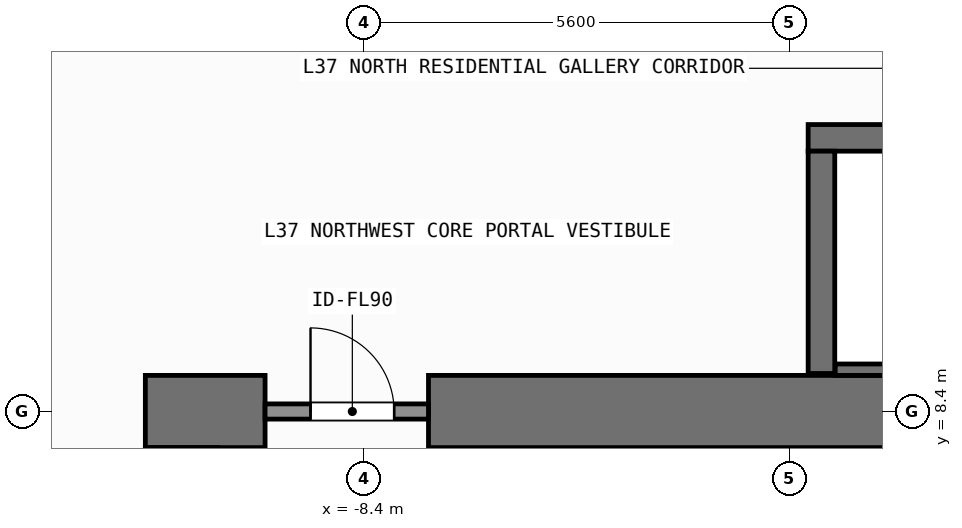
"""IFC4 building model, lengths in metres.
Left out: names, types, materials, properties, quantities, classifications, styles, units other than length and angle.
Written with IfcOpenShell. Run it as: python <this file> out.ifc"""

import sys

from ifc_helpers import new_model, si_unit, direction, frame, frame_2d, origin, place, context, subcontext, project, spatial, rectangle, extrude, element, fill, save


model = new_model("IFC4")
c1 = context("Model", 3, precision=1e-05, world=origin(), true_north=direction((0.0, 1.0)))
c2 = subcontext(c1, "Body", "Model", "MODEL_VIEW")
j1 = project(units=[si_unit("LENGTHUNIT", "METRE"), si_unit("PLANEANGLEUNIT", "RADIAN")], contexts=[c1])
p1 = place(None, origin())
s1 = spatial("IfcSite", under=j1, at=p1, CompositionType="ELEMENT")
p2 = place(p1, origin())
s2 = spatial("IfcBuilding", under=s1, at=p2, CompositionType="ELEMENT")
p3 = place(p2, frame((0.0, 0.0, 148.5)))
s3 = spatial("IfcBuildingStorey", under=s2, at=p3, CompositionType="ELEMENT", Elevation=148.5)
p4 = place(p3, frame((-11.275, 8.4, 0.0), z_axis=(0.0, 0.0, 1.0), x_axis=(1.0, 0.0, 0.0)))
e1 = element("IfcWall", 1, at=p4, inside=s3, PredefinedType="SHEAR", context=c2, shape_type="SweptSolid", body=[
    extrude(rectangle(XDim=1.575, YDim=0.95, at=frame_2d((0.788, 0.0))), origin(), (0.0, 0.0, 1.0), 3.9),
])
p5 = place(p3, frame((-7.55, 8.4, 0.0), z_axis=(0.0, 0.0, 1.0), x_axis=(1.0, 0.0, 0.0)))
e2 = element("IfcWall", 2, at=p5, inside=s3, PredefinedType="SHEAR", context=c2, shape_type="SweptSolid", body=[
    extrude(rectangle(XDim=16.425, YDim=0.95, at=frame_2d((8.212, 0.0))), origin(), (0.0, 0.0, 1.0), 3.9),
])
p6 = place(p3, frame((-10.8, -7.925, 0.0), z_axis=(0.0, 0.0, 1.0), x_axis=(0.0, 1.0, 0.0)))
e3 = element("IfcWall", 3, at=p6, inside=s3, PredefinedType="SHEAR", context=c2, shape_type="SweptSolid", body=[
    extrude(rectangle(XDim=15.85, YDim=0.95, at=frame_2d((7.925, 0.0))), origin(), (0.0, 0.0, 1.0), 3.9),
])
p7 = place(p3, frame((-2.555, 12.0, 0.0), z_axis=(0.0, 0.0, 1.0), x_axis=(1.0, 0.0, 0.0)))
e4 = element("IfcWall", 4, at=p7, inside=s3, PredefinedType="SHEAR", context=c2, shape_type="SweptSolid", body=[
    extrude(rectangle(XDim=7.31, YDim=0.35, at=frame_2d((3.655, 0.0))), origin(), (0.0, 0.0, 1.0), 3.9),
])
p8 = place(p3, frame((-2.2, 8.95, 0.0), z_axis=(0.0, 0.0, 1.0), x_axis=(1.0, 0.0, 0.0)))
e5 = element("IfcWall", 5, at=p8, inside=s3, PredefinedType="SHEAR", context=c2, shape_type="SweptSolid", body=[
    extrude(rectangle(XDim=6.6, YDim=0.15, at=frame_2d((3.3, 0.0))), origin(), (0.0, 0.0, 1.0), 3.9),
])
p9 = place(p3, frame((-2.38, 8.9, 0.0), z_axis=(0.0, 0.0, 1.0), x_axis=(0.0, 1.0, 0.0)))
e6 = element("IfcWall", 6, at=p9, inside=s3, PredefinedType="SHEAR", context=c2, shape_type="SweptSolid", body=[
    extrude(rectangle(XDim=2.925, YDim=0.35, at=frame_2d((1.462, 0.0))), origin(), (0.0, 0.0, 1.0), 3.9),
])
p10 = place(p3, frame((-9.7, 8.4, 0.0), z_axis=(0.0, 0.0, 1.0), x_axis=(1.0, 0.0, 0.0)))
e7 = element("IfcWall", 7, at=p10, inside=s3, PredefinedType="SOLIDWALL", context=c2, shape_type="SweptSolid", body=[
    extrude(rectangle(XDim=2.15, YDim=0.2, at=frame_2d((1.075, 0.0))), origin(), (0.0, 0.0, 1.0), 2.72),
])
p11 = place(p10, frame((0.598, 0.0, 0.0)))
e8 = element("IfcOpeningElement", 8, at=p11, cuts=e7, PredefinedType="OPENING", context=c2, shape_type="SweptSolid", body=[
    extrude(rectangle(XDim=1.1, YDim=2.15, at=frame_2d((0.55, 1.075))), frame((0.0, 0.11, 0.0), z_axis=(0.0, -1.0, 0.0), x_axis=(1.0, 0.0, 0.0)), (0.0, 0.0, 1.0), 0.22),
])
p12 = place(p11, origin())
e9 = element("IfcDoor", 9, at=p12, inside=s3, OperationType="SINGLE_SWING_LEFT", PredefinedType="DOOR", context=c2, shape_type="SweptSolid", body=[
    extrude(rectangle(XDim=1.1, YDim=2.15, at=frame_2d((0.55, 1.075))), frame((0.0, 0.025, 0.0), z_axis=(0.0, -1.0, 0.0), x_axis=(1.0, 0.0, 0.0)), (0.0, 0.0, 1.0), 0.05),
])
fill(e8, e9)
save(model, sys.argv[1])
